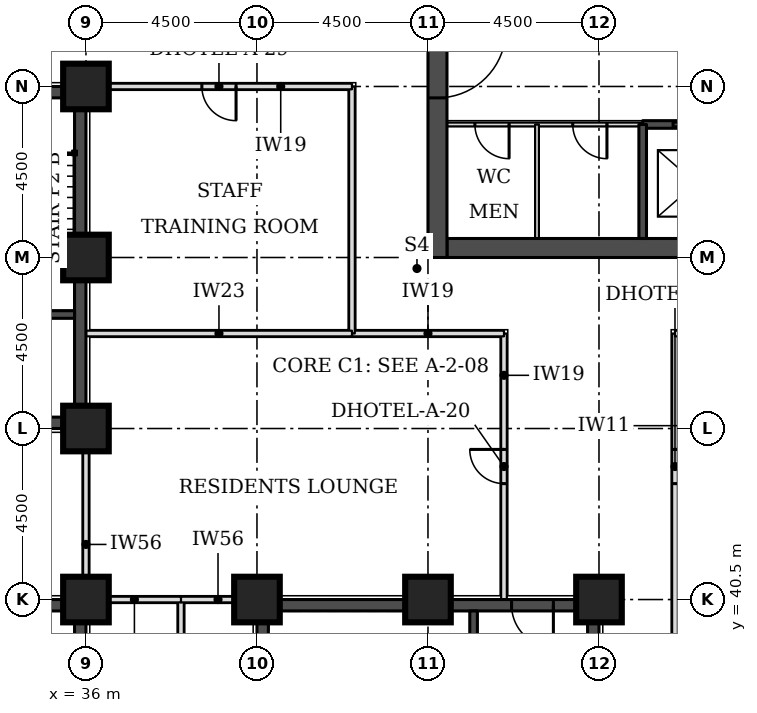
"""IFC4 building model, lengths in metres.
Left out: names, types, materials, properties, quantities, classifications, styles, units other than length and angle.
Written with IfcOpenShell. Run it as: python <this file> out.ifc"""

import sys

from ifc_helpers import new_model, si_unit, direction, frame, frame_2d, origin, origin_2d, place, context, subcontext, project, spatial, rectangle, extrude, element, fill, save


model = new_model("IFC4")
c1 = context("Model", 3, precision=1e-05, world=origin(), true_north=direction((0.0, 1.0)))
c2 = subcontext(c1, "Body", "Model", "MODEL_VIEW")
j1 = project(units=[si_unit("LENGTHUNIT", "METRE"), si_unit("PLANEANGLEUNIT", "RADIAN")], contexts=[c1])
p1 = place(None, origin())
s1 = spatial("IfcSite", under=j1, at=p1, CompositionType="ELEMENT")
p2 = place(p1, origin())
s2 = spatial("IfcBuilding", under=s1, at=p2, CompositionType="ELEMENT")
p3 = place(p2, frame((0.0, 0.0, 26.4)))
s3 = spatial("IfcBuildingStorey", under=s2, at=p3, CompositionType="ELEMENT", Elevation=26.4)
for number, where, z_axis, x_axis in (
    (1, (36.0, 40.5, 0.0), (0.0, 0.0, 1.0), (1.0, 0.0, 0.0)),
    (2, (40.5, 40.5, 0.0), (0.0, 0.0, 1.0), (1.0, 0.0, 0.0)),
    (3, (45.0, 40.5, 0.0), (0.0, 0.0, 1.0), (1.0, 0.0, 0.0)),
    (4, (49.5, 40.5, 0.0), (0.0, 0.0, 1.0), (1.0, 0.0, 0.0)),
    (5, (36.0, 45.0, 0.0), (0.0, 0.0, 1.0), (1.0, 0.0, 0.0)),
    (6, (36.0, 49.5, 0.0), (0.0, 0.0, 1.0), (1.0, 0.0, 0.0)),
    (7, (36.0, 54.0, 0.0), (0.0, 0.0, 1.0), (1.0, 0.0, 0.0)),
):
    element("IfcColumn", number, at=place(p3, frame(where, z_axis=z_axis, x_axis=x_axis)), inside=s3, PredefinedType="COLUMN", context=c2, shape_type="SweptSolid", body=[
        extrude(rectangle(XDim=1.2, YDim=1.2, at=origin_2d()), origin(), (0.0, 0.0, 1.0), 3.3),
    ])
p4 = place(p3, frame((45.5, 49.75, 0.0), z_axis=(0.0, 0.0, 1.0), x_axis=(1.0, 0.0, 0.0)))
e8 = element("IfcWall", 8, at=p4, inside=s3, PredefinedType="SHEAR", context=c2, shape_type="SweptSolid", body=[
    extrude(rectangle(XDim=21.5, YDim=0.5, at=frame_2d((10.75, 0.0))), origin(), (0.0, 0.0, 1.0), 3.3),
])
p5 = place(p3, frame((45.25, 49.5, 0.0), z_axis=(0.0, 0.0, 1.0), x_axis=(0.0, 1.0, 0.0)))
e9 = element("IfcWall", 9, at=p5, inside=s3, PredefinedType="SHEAR", context=c2, shape_type="SweptSolid", body=[
    extrude(rectangle(XDim=22.5, YDim=0.5, at=frame_2d((11.25, 0.0))), origin(), (0.0, 0.0, 1.0), 3.3),
])
p6 = place(p5, frame((4.2, 0.0, 0.0)))
e10 = element("IfcOpeningElement", 10, at=p6, cuts=e9, PredefinedType="OPENING", context=c2, shape_type="SweptSolid", body=[
    extrude(rectangle(XDim=1.8, YDim=2.1, at=frame_2d((0.9, 1.05))), frame((0.0, 0.26, 0.0), z_axis=(0.0, -1.0, 0.0), x_axis=(1.0, 0.0, 0.0)), (0.0, 0.0, 1.0), 0.52),
])
p7 = place(p5, frame((6.9, 0.0, 0.0)))
e11 = element("IfcOpeningElement", 11, at=p7, cuts=e9, PredefinedType="OPENING", context=c2, shape_type="SweptSolid", body=[
    extrude(rectangle(XDim=1.1, YDim=2.1, at=frame_2d((0.55, 1.05))), frame((0.0, 0.26, 0.0), z_axis=(0.0, -1.0, 0.0), x_axis=(1.0, 0.0, 0.0)), (0.0, 0.0, 1.0), 0.52),
])
p8 = place(p5, frame((13.6, 0.0, 0.0)))
e12 = element("IfcOpeningElement", 12, at=p8, cuts=e9, PredefinedType="OPENING", context=c2, shape_type="SweptSolid", body=[
    extrude(rectangle(XDim=1.1, YDim=2.1, at=frame_2d((0.55, 1.05))), frame((0.0, 0.26, 0.0), z_axis=(0.0, -1.0, 0.0), x_axis=(1.0, 0.0, 0.0)), (0.0, 0.0, 1.0), 0.52),
])
p9 = place(p5, frame((16.5, 0.0, 0.0)))
e13 = element("IfcOpeningElement", 13, at=p9, cuts=e9, PredefinedType="OPENING", context=c2, shape_type="SweptSolid", body=[
    extrude(rectangle(XDim=1.8, YDim=2.1, at=frame_2d((0.9, 1.05))), frame((0.0, 0.26, 0.0), z_axis=(0.0, -1.0, 0.0), x_axis=(1.0, 0.0, 0.0)), (0.0, 0.0, 1.0), 0.52),
])
p10 = place(p3, frame((27.3, 45.15, 0.0), z_axis=(0.0, 0.0, 1.0), x_axis=(1.0, 0.0, 0.0)))
e14 = element("IfcWall", 14, at=p10, inside=s3, PredefinedType="SHEAR", context=c2, shape_type="SweptSolid", body=[
    extrude(rectangle(XDim=8.4, YDim=0.3, at=frame_2d((4.2, 0.0))), origin(), (0.0, 0.0, 1.0), 3.3),
])
p11 = place(p10, frame((5.2, 0.0, 0.0)))
e15 = element("IfcOpeningElement", 15, at=p11, cuts=e14, PredefinedType="OPENING", context=c2, shape_type="SweptSolid", body=[
    extrude(rectangle(XDim=1.0, YDim=2.1, at=frame_2d((0.5, 1.05))), frame((0.0, 0.16, 0.0), z_axis=(0.0, -1.0, 0.0), x_axis=(1.0, 0.0, 0.0)), (0.0, 0.0, 1.0), 0.32),
])
p12 = place(p3, frame((27.3, 53.85, 0.0), z_axis=(0.0, 0.0, 1.0), x_axis=(1.0, 0.0, 0.0)))
e16 = element("IfcWall", 16, at=p12, inside=s3, PredefinedType="SHEAR", context=c2, shape_type="SweptSolid", body=[
    extrude(rectangle(XDim=8.4, YDim=0.3, at=frame_2d((4.2, 0.0))), origin(), (0.0, 0.0, 1.0), 3.3),
])
p13 = place(p12, frame((6.4, 0.0, 0.0)))
e17 = element("IfcOpeningElement", 17, at=p13, cuts=e16, PredefinedType="OPENING", context=c2, shape_type="SweptSolid", body=[
    extrude(rectangle(XDim=1.1, YDim=2.1, at=frame_2d((0.55, 1.05))), frame((0.0, 0.16, 0.0), z_axis=(0.0, -1.0, 0.0), x_axis=(1.0, 0.0, 0.0)), (0.0, 0.0, 1.0), 0.32),
])
p14 = place(p3, frame((35.85, 45.0, 0.0), z_axis=(0.0, 0.0, 1.0), x_axis=(0.0, 1.0, 0.0)))
e18 = element("IfcWall", 18, at=p14, inside=s3, PredefinedType="SHEAR", context=c2, shape_type="SweptSolid", body=[
    extrude(rectangle(XDim=9.0, YDim=0.3, at=frame_2d((4.5, 0.0))), origin(), (0.0, 0.0, 1.0), 3.3),
])
p15 = place(p3, frame((40.8, 40.35, 0.0), z_axis=(0.0, 0.0, 1.0), x_axis=(1.0, 0.0, 0.0)))
e19 = element("IfcWall", 19, at=p15, inside=s3, PredefinedType="SHEAR", context=c2, shape_type="SweptSolid", body=[
    extrude(rectangle(XDim=8.4, YDim=0.3, at=frame_2d((4.2, 0.0))), origin(), (0.0, 0.0, 1.0), 3.3),
])
p16 = place(p15, frame((6.4, 0.0, 0.0)))
e20 = element("IfcOpeningElement", 20, at=p16, cuts=e19, PredefinedType="OPENING", context=c2, shape_type="SweptSolid", body=[
    extrude(rectangle(XDim=1.1, YDim=2.1, at=frame_2d((0.55, 1.05))), frame((0.0, 0.16, 0.0), z_axis=(0.0, -1.0, 0.0), x_axis=(1.0, 0.0, 0.0)), (0.0, 0.0, 1.0), 0.32),
])
p17 = place(p3, frame((40.65, 31.5, 0.0), z_axis=(0.0, 0.0, 1.0), x_axis=(0.0, 1.0, 0.0)))
e21 = element("IfcWall", 21, at=p17, inside=s3, PredefinedType="SHEAR", context=c2, shape_type="SweptSolid", body=[
    extrude(rectangle(XDim=9.0, YDim=0.3, at=frame_2d((4.5, 0.0))), origin(), (0.0, 0.0, 1.0), 3.3),
])
p18 = place(p17, frame((0.4, 0.0, 0.0)))
e22 = element("IfcOpeningElement", 22, at=p18, cuts=e21, PredefinedType="OPENING", context=c2, shape_type="SweptSolid", body=[
    extrude(rectangle(XDim=1.1, YDim=2.1, at=frame_2d((0.55, 1.05))), frame((0.0, 0.16, 0.0), z_axis=(0.0, -1.0, 0.0), x_axis=(1.0, 0.0, 0.0)), (0.0, 0.0, 1.0), 0.32),
])
p19 = place(p3, frame((49.35, 31.5, 0.0), z_axis=(0.0, 0.0, 1.0), x_axis=(0.0, 1.0, 0.0)))
e23 = element("IfcWall", 23, at=p19, inside=s3, PredefinedType="SHEAR", context=c2, shape_type="SweptSolid", body=[
    extrude(rectangle(XDim=9.0, YDim=0.3, at=frame_2d((4.5, 0.0))), origin(), (0.0, 0.0, 1.0), 3.3),
])
p20 = place(p3, frame((27.3, 40.35, 0.0), z_axis=(0.0, 0.0, 1.0), x_axis=(1.0, 0.0, 0.0)))
e24 = element("IfcWall", 24, at=p20, inside=s3, PredefinedType="SHEAR", context=c2, shape_type="SweptSolid", body=[
    extrude(rectangle(XDim=8.4, YDim=0.3, at=frame_2d((4.2, 0.0))), origin(), (0.0, 0.0, 1.0), 3.3),
])
p21 = place(p20, frame((6.4, 0.0, 0.0)))
e25 = element("IfcOpeningElement", 25, at=p21, cuts=e24, PredefinedType="OPENING", context=c2, shape_type="SweptSolid", body=[
    extrude(rectangle(XDim=1.1, YDim=2.1, at=frame_2d((0.55, 1.05))), frame((0.0, 0.16, 0.0), z_axis=(0.0, -1.0, 0.0), x_axis=(1.0, 0.0, 0.0)), (0.0, 0.0, 1.0), 0.32),
])
p22 = place(p3, frame((35.85, 31.5, 0.0), z_axis=(0.0, 0.0, 1.0), x_axis=(0.0, 1.0, 0.0)))
e26 = element("IfcWall", 26, at=p22, inside=s3, PredefinedType="SHEAR", context=c2, shape_type="SweptSolid", body=[
    extrude(rectangle(XDim=9.0, YDim=0.3, at=frame_2d((4.5, 0.0))), origin(), (0.0, 0.0, 1.0), 3.3),
])
p23 = place(p3, frame((51.5, 40.5, 0.0), z_axis=(0.0, 0.0, 1.0), x_axis=(1.0, 0.0, 0.0)))
e27 = element("IfcWall", 27, at=p23, inside=s3, PredefinedType="PARTITIONING", context=c2, shape_type="SweptSolid", body=[
    extrude(rectangle(XDim=6.4, YDim=0.2, at=frame_2d((3.2, 0.0))), origin(), (0.0, 0.0, 1.0), 2.33),
])
p24 = place(p3, frame((51.5, 23.65, 0.0), z_axis=(0.0, 0.0, 1.0), x_axis=(0.0, 1.0, 0.0)))
e28 = element("IfcWall", 28, at=p24, inside=s3, PredefinedType="PARTITIONING", context=c2, shape_type="SweptSolid", body=[
    extrude(rectangle(XDim=23.85, YDim=0.15, at=frame_2d((11.925, 0.0))), origin(), (0.0, 0.0, 1.0), 3.08),
])
p25 = place(p24, frame((4.075, 0.0, 0.0)))
e29 = element("IfcOpeningElement", 29, at=p25, cuts=e28, PredefinedType="OPENING", context=c2, shape_type="SweptSolid", body=[
    extrude(rectangle(XDim=1.0, YDim=2.1, at=frame_2d((0.5, 1.05))), frame((0.0, 0.085, 0.0), z_axis=(0.0, -1.0, 0.0), x_axis=(1.0, 0.0, 0.0)), (0.0, 0.0, 1.0), 0.17),
])
p26 = place(p24, frame((10.375, 0.0, 0.0)))
e30 = element("IfcOpeningElement", 30, at=p26, cuts=e28, PredefinedType="OPENING", context=c2, shape_type="SweptSolid", body=[
    extrude(rectangle(XDim=1.0, YDim=2.1, at=frame_2d((0.5, 1.05))), frame((0.0, 0.085, 0.0), z_axis=(0.0, -1.0, 0.0), x_axis=(1.0, 0.0, 0.0)), (0.0, 0.0, 1.0), 0.17),
])
p27 = place(p24, frame((19.9, 0.0, 0.0)))
e31 = element("IfcOpeningElement", 31, at=p27, cuts=e28, PredefinedType="OPENING", context=c2, shape_type="SweptSolid", body=[
    extrude(rectangle(XDim=0.9, YDim=2.1, at=frame_2d((0.45, 1.05))), frame((0.0, 0.085, 0.0), z_axis=(0.0, -1.0, 0.0), x_axis=(1.0, 0.0, 0.0)), (0.0, 0.0, 1.0), 0.17),
])
p28 = place(p3, frame((38.5, 25.65, 0.0), z_axis=(0.0, 0.0, 1.0), x_axis=(0.0, 1.0, 0.0)))
e32 = element("IfcWall", 32, at=p28, inside=s3, PredefinedType="PARTITIONING", context=c2, shape_type="SweptSolid", body=[
    extrude(rectangle(XDim=14.85, YDim=0.15, at=frame_2d((7.425, 0.0))), origin(), (0.0, 0.0, 1.0), 3.08),
])
p29 = place(p28, frame((6.975, 0.0, 0.0)))
e33 = element("IfcOpeningElement", 33, at=p29, cuts=e32, PredefinedType="OPENING", context=c2, shape_type="SweptSolid", body=[
    extrude(rectangle(XDim=0.9, YDim=2.1, at=frame_2d((0.45, 1.05))), frame((0.0, 0.085, 0.0), z_axis=(0.0, -1.0, 0.0), x_axis=(1.0, 0.0, 0.0)), (0.0, 0.0, 1.0), 0.17),
])
p30 = place(p3, frame((38.5, 40.5, 0.0), z_axis=(0.0, 0.0, 1.0), x_axis=(1.0, 0.0, 0.0)))
e34 = element("IfcWall", 34, at=p30, inside=s3, PredefinedType="PARTITIONING", context=c2, shape_type="SweptSolid", body=[
    extrude(rectangle(XDim=1.95, YDim=0.15, at=frame_2d((0.975, 0.0))), origin(), (0.0, 0.0, 1.0), 2.33),
])
p31 = place(p3, frame((36.0, 40.55, 0.0), z_axis=(0.0, 0.0, 1.0), x_axis=(0.0, 1.0, 0.0)))
e35 = element("IfcWall", 35, at=p31, inside=s3, PredefinedType="PARTITIONING", context=c2, shape_type="SweptSolid", body=[
    extrude(rectangle(XDim=4.4, YDim=0.15, at=frame_2d((2.2, 0.0))), origin(), (0.0, 0.0, 1.0), 2.33),
])
p32 = place(p3, frame((47.0, 40.5, 0.0), z_axis=(0.0, 0.0, 1.0), x_axis=(0.0, 1.0, 0.0)))
e36 = element("IfcWall", 36, at=p32, inside=s3, PredefinedType="PARTITIONING", context=c2, shape_type="SweptSolid", body=[
    extrude(rectangle(XDim=7.0, YDim=0.15, at=frame_2d((3.5, 0.0))), origin(), (0.0, 0.0, 1.0), 3.08),
])
p33 = place(p32, frame((3.05, 0.0, 0.0)))
e37 = element("IfcOpeningElement", 37, at=p33, cuts=e36, PredefinedType="OPENING", context=c2, shape_type="SweptSolid", body=[
    extrude(rectangle(XDim=0.9, YDim=2.1, at=frame_2d((0.45, 1.05))), frame((0.0, 0.085, 0.0), z_axis=(0.0, -1.0, 0.0), x_axis=(1.0, 0.0, 0.0)), (0.0, 0.0, 1.0), 0.17),
])
p34 = place(p3, frame((43.0, 47.5, 0.0), z_axis=(0.0, 0.0, 1.0), x_axis=(1.0, 0.0, 0.0)))
e38 = element("IfcWall", 38, at=p34, inside=s3, PredefinedType="PARTITIONING", context=c2, shape_type="SweptSolid", body=[
    extrude(rectangle(XDim=4.0, YDim=0.15, at=frame_2d((2.0, 0.0))), origin(), (0.0, 0.0, 1.0), 3.08),
])
p35 = place(p3, frame((43.0, 47.5, 0.0), z_axis=(0.0, 0.0, 1.0), x_axis=(0.0, 1.0, 0.0)))
e39 = element("IfcWall", 39, at=p35, inside=s3, PredefinedType="PARTITIONING", context=c2, shape_type="SweptSolid", body=[
    extrude(rectangle(XDim=6.5, YDim=0.15, at=frame_2d((3.25, 0.0))), origin(), (0.0, 0.0, 1.0), 3.08),
])
p36 = place(p3, frame((51.5, 47.5, 0.0), z_axis=(0.0, 0.0, 1.0), x_axis=(1.0, 0.0, 0.0)))
e40 = element("IfcWall", 40, at=p36, inside=s3, PredefinedType="PARTITIONING", context=c2, shape_type="SweptSolid", body=[
    extrude(rectangle(XDim=18.0, YDim=0.15, at=frame_2d((9.0, 0.0))), origin(), (0.0, 0.0, 1.0), 3.08),
])
p37 = place(p36, frame((12.075, 0.0, 0.0)))
e41 = element("IfcOpeningElement", 41, at=p37, cuts=e40, PredefinedType="OPENING", context=c2, shape_type="SweptSolid", body=[
    extrude(rectangle(XDim=1.0, YDim=2.1, at=frame_2d((0.5, 1.05))), frame((0.0, 0.085, 0.0), z_axis=(0.0, -1.0, 0.0), x_axis=(1.0, 0.0, 0.0)), (0.0, 0.0, 1.0), 0.17),
])
p38 = place(p36, frame((9.675, 0.0, 0.0)))
e42 = element("IfcOpeningElement", 42, at=p38, cuts=e40, PredefinedType="OPENING", context=c2, shape_type="SweptSolid", body=[
    extrude(rectangle(XDim=1.0, YDim=2.1, at=frame_2d((0.5, 1.05))), frame((0.0, 0.085, 0.0), z_axis=(0.0, -1.0, 0.0), x_axis=(1.0, 0.0, 0.0)), (0.0, 0.0, 1.0), 0.17),
])
p39 = place(p36, frame((16.5, 0.0, 0.0)))
e43 = element("IfcOpeningElement", 43, at=p39, cuts=e40, PredefinedType="OPENING", context=c2, shape_type="SweptSolid", body=[
    extrude(rectangle(XDim=1.0, YDim=2.1, at=frame_2d((0.5, 1.05))), frame((0.0, 0.085, 0.0), z_axis=(0.0, -1.0, 0.0), x_axis=(1.0, 0.0, 0.0)), (0.0, 0.0, 1.0), 0.17),
])
p40 = place(p3, frame((36.05, 54.0, 0.0), z_axis=(0.0, 0.0, 1.0), x_axis=(1.0, 0.0, 0.0)))
e44 = element("IfcWall", 44, at=p40, inside=s3, PredefinedType="PARTITIONING", context=c2, shape_type="SweptSolid", body=[
    extrude(rectangle(XDim=6.95, YDim=0.15, at=frame_2d((3.475, 0.0))), origin(), (0.0, 0.0, 1.0), 3.08),
])
p41 = place(p40, frame((3.0, 0.0, 0.0)))
e45 = element("IfcOpeningElement", 45, at=p41, cuts=e44, PredefinedType="OPENING", context=c2, shape_type="SweptSolid", body=[
    extrude(rectangle(XDim=0.9, YDim=2.1, at=frame_2d((0.45, 1.05))), frame((0.0, 0.085, 0.0), z_axis=(0.0, -1.0, 0.0), x_axis=(1.0, 0.0, 0.0)), (0.0, 0.0, 1.0), 0.17),
])
p42 = place(p3, frame((36.05, 40.5, 0.0), z_axis=(0.0, 0.0, 1.0), x_axis=(1.0, 0.0, 0.0)))
e46 = element("IfcWall", 46, at=p42, inside=s3, PredefinedType="PARTITIONING", context=c2, shape_type="SweptSolid", body=[
    extrude(rectangle(XDim=2.45, YDim=0.15, at=frame_2d((1.225, 0.0))), origin(), (0.0, 0.0, 1.0), 2.33),
])
p43 = place(p3, frame((36.0, 47.5, 0.0), z_axis=(0.0, 0.0, 1.0), x_axis=(1.0, 0.0, 0.0)))
e47 = element("IfcWall", 47, at=p43, inside=s3, PredefinedType="PARTITIONING", context=c2, shape_type="SweptSolid", body=[
    extrude(rectangle(XDim=7.0, YDim=0.15, at=frame_2d((3.5, 0.0))), origin(), (0.0, 0.0, 1.0), 3.08),
])
p44 = place(p3, frame((45.5, 53.0, 0.0), z_axis=(0.0, 0.0, 1.0), x_axis=(1.0, 0.0, 0.0)))
e48 = element("IfcWall", 48, at=p44, inside=s3, PredefinedType="PARTITIONING", context=c2, shape_type="SweptSolid", body=[
    extrude(rectangle(XDim=5.15, YDim=0.1, at=frame_2d((2.575, 0.0))), origin(), (0.0, 0.0, 1.0), 3.08),
])
p45 = place(p44, frame((0.735, 0.0, 0.0)))
e49 = element("IfcOpeningElement", 49, at=p45, cuts=e48, PredefinedType="OPENING", context=c2, shape_type="SweptSolid", body=[
    extrude(rectangle(XDim=0.9, YDim=2.1, at=frame_2d((0.45, 1.05))), frame((0.0, 0.06, 0.0), z_axis=(0.0, -1.0, 0.0), x_axis=(1.0, 0.0, 0.0)), (0.0, 0.0, 1.0), 0.12),
])
p46 = place(p44, frame((3.31, 0.0, 0.0)))
e50 = element("IfcOpeningElement", 50, at=p46, cuts=e48, PredefinedType="OPENING", context=c2, shape_type="SweptSolid", body=[
    extrude(rectangle(XDim=0.9, YDim=2.1, at=frame_2d((0.45, 1.05))), frame((0.0, 0.06, 0.0), z_axis=(0.0, -1.0, 0.0), x_axis=(1.0, 0.0, 0.0)), (0.0, 0.0, 1.0), 0.12),
])
p47 = place(p3, frame((50.65, 53.0, 0.0), z_axis=(0.0, 0.0, 1.0), x_axis=(1.0, 0.0, 0.0)))
e51 = element("IfcWall", 51, at=p47, inside=s3, PredefinedType="SOLIDWALL", context=c2, shape_type="SweptSolid", body=[
    extrude(rectangle(XDim=11.2, YDim=0.2, at=frame_2d((5.6, 0.0))), origin(), (0.0, 0.0, 1.0), 3.08),
])
p48 = place(p47, frame((0.8, 0.0, 0.0)))
e52 = element("IfcOpeningElement", 52, at=p48, cuts=e51, PredefinedType="OPENING", context=c2, shape_type="SweptSolid", body=[
    extrude(rectangle(XDim=1.2, YDim=2.1, at=frame_2d((0.6, 1.05))), frame((0.0, 0.11, 0.0), z_axis=(0.0, -1.0, 0.0), x_axis=(1.0, 0.0, 0.0)), (0.0, 0.0, 1.0), 0.22),
])
p49 = place(p47, frame((3.6, 0.0, 0.0)))
e53 = element("IfcOpeningElement", 53, at=p49, cuts=e51, PredefinedType="OPENING", context=c2, shape_type="SweptSolid", body=[
    extrude(rectangle(XDim=1.2, YDim=2.1, at=frame_2d((0.6, 1.05))), frame((0.0, 0.11, 0.0), z_axis=(0.0, -1.0, 0.0), x_axis=(1.0, 0.0, 0.0)), (0.0, 0.0, 1.0), 0.22),
])
p50 = place(p47, frame((6.4, 0.0, 0.0)))
e54 = element("IfcOpeningElement", 54, at=p50, cuts=e51, PredefinedType="OPENING", context=c2, shape_type="SweptSolid", body=[
    extrude(rectangle(XDim=1.2, YDim=2.1, at=frame_2d((0.6, 1.05))), frame((0.0, 0.11, 0.0), z_axis=(0.0, -1.0, 0.0), x_axis=(1.0, 0.0, 0.0)), (0.0, 0.0, 1.0), 0.22),
])
p51 = place(p47, frame((9.2, 0.0, 0.0)))
e55 = element("IfcOpeningElement", 55, at=p51, cuts=e51, PredefinedType="OPENING", context=c2, shape_type="SweptSolid", body=[
    extrude(rectangle(XDim=1.2, YDim=2.1, at=frame_2d((0.6, 1.05))), frame((0.0, 0.11, 0.0), z_axis=(0.0, -1.0, 0.0), x_axis=(1.0, 0.0, 0.0)), (0.0, 0.0, 1.0), 0.22),
])
p52 = place(p3, frame((47.869, 50.0, 0.0), z_axis=(0.0, 0.0, 1.0), x_axis=(0.0, 1.0, 0.0)))
e56 = element("IfcWall", 56, at=p52, inside=s3, PredefinedType="PARTITIONING", context=c2, shape_type="SweptSolid", body=[
    extrude(rectangle(XDim=3.0, YDim=0.1, at=frame_2d((1.5, 0.0))), origin(), (0.0, 0.0, 1.0), 3.08),
])
for number, where, z_axis, x_axis in (
    (57, (50.65, 50.0, 0.0), (0.0, 0.0, 1.0), (0.0, 1.0, 0.0)),
    (58, (32.7, 48.0, 0.0), (0.0, 0.0, 1.0), (1.0, 0.0, 0.0)),
):
    element("IfcWall", number, at=place(p3, frame(where, z_axis=z_axis, x_axis=x_axis)), inside=s3, PredefinedType="SOLIDWALL", context=c2, shape_type="SweptSolid", body=[
        extrude(rectangle(XDim=3.0, YDim=0.2, at=frame_2d((1.5, 0.0))), origin(), (0.0, 0.0, 1.0), 3.08),
    ])
p53 = place(p3, frame((46.2, 34.5, 0.0), z_axis=(0.0, 0.0, 1.0), x_axis=(0.0, 1.0, 0.0)))
e59 = element("IfcWall", 59, at=p53, inside=s3, PredefinedType="SOLIDWALL", context=c2, shape_type="SweptSolid", body=[
    extrude(rectangle(XDim=5.7, YDim=0.2, at=frame_2d((2.85, 0.0))), origin(), (0.0, 0.0, 1.0), 3.08),
])
p54 = place(p41, frame((0.9, 0.0, 0.0), z_axis=(0.0, 0.0, 1.0), x_axis=(-1.0, 0.0, 0.0)))
e60 = element("IfcDoor", 60, at=p54, inside=s3, OperationType="SINGLE_SWING_LEFT", PredefinedType="DOOR", context=c2, shape_type="SweptSolid", body=[
    extrude(rectangle(XDim=0.9, YDim=2.1, at=frame_2d((0.45, 1.05))), frame((0.0, 0.025, 0.0), z_axis=(0.0, -1.0, 0.0), x_axis=(1.0, 0.0, 0.0)), (0.0, 0.0, 1.0), 0.05),
])
fill(e45, e60)
p55 = place(p33, origin())
e61 = element("IfcDoor", 61, at=p55, inside=s3, OperationType="SINGLE_SWING_RIGHT", PredefinedType="DOOR", context=c2, shape_type="SweptSolid", body=[
    extrude(rectangle(XDim=0.9, YDim=2.1, at=frame_2d((0.45, 1.05))), frame((0.0, 0.025, 0.0), z_axis=(0.0, -1.0, 0.0), x_axis=(1.0, 0.0, 0.0)), (0.0, 0.0, 1.0), 0.05),
])
fill(e37, e61)
p56 = place(p27, frame((0.9, 0.0, 0.0), z_axis=(0.0, 0.0, 1.0), x_axis=(-1.0, 0.0, 0.0)))
e62 = element("IfcDoor", 62, at=p56, inside=s3, OperationType="SINGLE_SWING_LEFT", PredefinedType="DOOR", context=c2, shape_type="SweptSolid", body=[
    extrude(rectangle(XDim=0.9, YDim=2.1, at=frame_2d((0.45, 1.05))), frame((0.0, 0.025, 0.0), z_axis=(0.0, -1.0, 0.0), x_axis=(1.0, 0.0, 0.0)), (0.0, 0.0, 1.0), 0.05),
])
fill(e31, e62)
p57 = place(p48, origin())
e63 = element("IfcDoor", 63, at=p57, inside=s3, OperationType="DOUBLE_DOOR_SLIDING", PredefinedType="DOOR", context=c2, shape_type="SweptSolid", body=[
    extrude(rectangle(XDim=1.2, YDim=2.1, at=frame_2d((0.6, 1.05))), frame((0.0, 0.025, 0.0), z_axis=(0.0, -1.0, 0.0), x_axis=(1.0, 0.0, 0.0)), (0.0, 0.0, 1.0), 0.05),
])
fill(e52, e63)
p58 = place(p6, frame((1.8, 0.0, 0.0), z_axis=(0.0, 0.0, 1.0), x_axis=(-1.0, 0.0, 0.0)))
e64 = element("IfcDoor", 64, at=p58, inside=s3, OperationType="SINGLE_SWING_LEFT", PredefinedType="DOOR", context=c2, shape_type="SweptSolid", body=[
    extrude(rectangle(XDim=1.8, YDim=2.1, at=frame_2d((0.9, 1.05))), frame((0.0, 0.025, 0.0), z_axis=(0.0, -1.0, 0.0), x_axis=(1.0, 0.0, 0.0)), (0.0, 0.0, 1.0), 0.05),
])
fill(e10, e64)
p59 = place(p45, frame((0.9, 0.0, 0.0), z_axis=(0.0, 0.0, 1.0), x_axis=(-1.0, 0.0, 0.0)))
e65 = element("IfcDoor", 65, at=p59, inside=s3, OperationType="SINGLE_SWING_LEFT", PredefinedType="DOOR", context=c2, shape_type="SweptSolid", body=[
    extrude(rectangle(XDim=0.9, YDim=2.1, at=frame_2d((0.45, 1.05))), frame((0.0, 0.025, 0.0), z_axis=(0.0, -1.0, 0.0), x_axis=(1.0, 0.0, 0.0)), (0.0, 0.0, 1.0), 0.05),
])
fill(e49, e65)
p60 = place(p46, frame((0.9, 0.0, 0.0), z_axis=(0.0, 0.0, 1.0), x_axis=(-1.0, 0.0, 0.0)))
e66 = element("IfcDoor", 66, at=p60, inside=s3, OperationType="SINGLE_SWING_LEFT", PredefinedType="DOOR", context=c2, shape_type="SweptSolid", body=[
    extrude(rectangle(XDim=0.9, YDim=2.1, at=frame_2d((0.45, 1.05))), frame((0.0, 0.025, 0.0), z_axis=(0.0, -1.0, 0.0), x_axis=(1.0, 0.0, 0.0)), (0.0, 0.0, 1.0), 0.05),
])
fill(e50, e66)
p61 = place(p16, frame((1.1, 0.0, 0.0), z_axis=(0.0, 0.0, 1.0), x_axis=(-1.0, 0.0, 0.0)))
e67 = element("IfcDoor", 67, at=p61, inside=s3, OperationType="SINGLE_SWING_LEFT", PredefinedType="DOOR", context=c2, shape_type="SweptSolid", body=[
    extrude(rectangle(XDim=1.1, YDim=2.1, at=frame_2d((0.55, 1.05))), frame((0.0, 0.025, 0.0), z_axis=(0.0, -1.0, 0.0), x_axis=(1.0, 0.0, 0.0)), (0.0, 0.0, 1.0), 0.05),
])
fill(e20, e67)
save(model, sys.argv[1])
